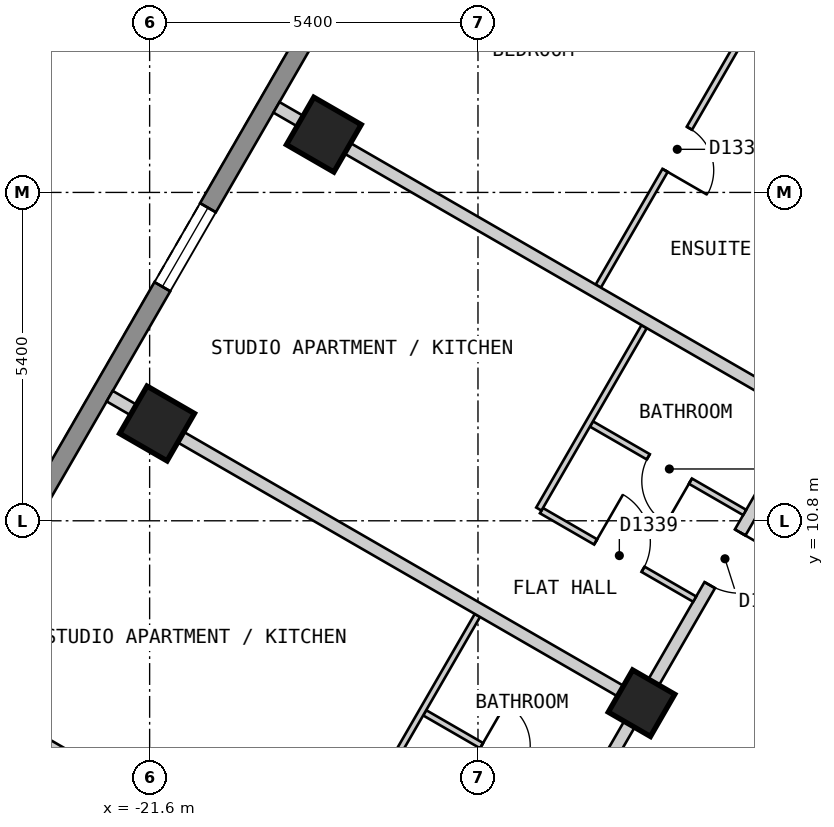
"""IFC4 building model, lengths in metres.
Left out: names, types, materials, properties, quantities, classifications, styles, units other than length and angle.
Written with IfcOpenShell. Run it as: python <this file> out.ifc"""

import sys

from ifc_helpers import new_model, si_unit, direction, frame, frame_2d, origin, origin_2d, place, context, subcontext, project, spatial, polyline, rectangle, outline, extrude, element, fill, save


model = new_model("IFC4")
c1 = context("Model", 3, precision=1e-05, world=origin(), true_north=direction((0.0, 1.0)))
c2 = subcontext(c1, "Body", "Model", "MODEL_VIEW")
j1 = project(units=[si_unit("LENGTHUNIT", "METRE"), si_unit("PLANEANGLEUNIT", "RADIAN")], contexts=[c1])
p1 = place(None, origin())
s1 = spatial("IfcSite", under=j1, at=p1, CompositionType="ELEMENT")
p2 = place(p1, origin())
s2 = spatial("IfcBuilding", under=s1, at=p2, CompositionType="ELEMENT")
p3 = place(p2, frame((0.0, 0.0, 135.6)))
s3 = spatial("IfcBuildingStorey", under=s2, at=p3, CompositionType="ELEMENT", Elevation=135.6)
for number, where, z_axis, x_axis in (
    (1, (-18.735, 17.15, 0.0), (0.0, 0.0, 1.0), (-0.5, -0.866, 0.0)),
    (2, (-21.478, 12.4, 0.0), (0.0, 0.0, 1.0), (-0.5, -0.866, 0.0)),
):
    element("IfcColumn", number, at=place(p3, frame(where, z_axis=z_axis, x_axis=x_axis)), inside=s3, PredefinedType="COLUMN", context=c2, shape_type="SweptSolid", body=[
        extrude(rectangle(XDim=0.9, YDim=0.9, at=origin_2d()), origin(), (0.0, 0.0, 1.0), 3.0),
    ])
p4 = place(p3, frame((-13.51, 7.8, 0.0), z_axis=(0.0, 0.0, 1.0), x_axis=(-0.5, -0.866025403784, 0.0)))
e3 = element("IfcColumn", 3, at=p4, inside=s3, PredefinedType="COLUMN", context=c2, shape_type="SweptSolid", body=[
    extrude(rectangle(XDim=0.8, YDim=0.8, at=origin_2d()), origin(), (0.0, 0.0, 1.0), 3.0),
])
p5 = place(p3, frame((-16.555, 23.025, 0.0), z_axis=(0.0, 0.0, 1.0), x_axis=(-0.500020536353, -0.866013546791, 0.0)))
e4 = element("IfcWall", 4, at=p5, inside=s3, PredefinedType="SOLIDWALL", context=c2, shape_type="SweptSolid", body=[
    extrude(outline(polyline([(0.0, -0.15), (23.325, -0.15), (23.245, 0.15), (0.08, 0.15), (0.0, -0.15)])), origin(), (0.0, 0.0, 1.0), 2.7),
])
p6 = place(p5, frame((2.685, 0.0, 0.15)))
e5 = element("IfcOpeningElement", 5, at=p6, cuts=e4, PredefinedType="OPENING", context=c2, shape_type="SweptSolid", body=[
    extrude(rectangle(XDim=1.5, YDim=2.1, at=frame_2d((0.75, 1.05))), frame((0.0, 0.16, 0.0), z_axis=(0.0, -1.0, 0.0), x_axis=(1.0, 0.0, 0.0)), (0.0, 0.0, 1.0), 0.32),
])
p7 = place(p5, frame((8.171, 0.0, 0.15)))
e6 = element("IfcOpeningElement", 6, at=p7, cuts=e4, PredefinedType="OPENING", context=c2, shape_type="SweptSolid", body=[
    extrude(rectangle(XDim=1.5, YDim=2.1, at=frame_2d((0.75, 1.05))), frame((0.0, 0.16, 0.0), z_axis=(0.0, -1.0, 0.0), x_axis=(1.0, 0.0, 0.0)), (0.0, 0.0, 1.0), 0.32),
])
p8 = place(p5, frame((13.655, 0.0, 0.15)))
e7 = element("IfcOpeningElement", 7, at=p8, cuts=e4, PredefinedType="OPENING", context=c2, shape_type="SweptSolid", body=[
    extrude(rectangle(XDim=1.5, YDim=2.1, at=frame_2d((0.75, 1.05))), frame((0.0, 0.16, 0.0), z_axis=(0.0, -1.0, 0.0), x_axis=(1.0, 0.0, 0.0)), (0.0, 0.0, 1.0), 0.32),
])
p9 = place(p5, frame((19.14, 0.0, 0.15)))
e8 = element("IfcOpeningElement", 8, at=p9, cuts=e4, PredefinedType="OPENING", context=c2, shape_type="SweptSolid", body=[
    extrude(rectangle(XDim=1.5, YDim=2.1, at=frame_2d((0.75, 1.05))), frame((0.0, 0.16, 0.0), z_axis=(0.0, -1.0, 0.0), x_axis=(1.0, 0.0, 0.0)), (0.0, 0.0, 1.0), 0.32),
])
p10 = place(p3, frame((-15.242, 0.399, 0.0), z_axis=(0.0, 0.0, 1.0), x_axis=(0.499953615651, 0.866052182145, 0.0)))
e9 = element("IfcWall", 9, at=p10, inside=s3, PredefinedType="PARTITIONING", context=c2, shape_type="SweptSolid", body=[
    extrude(rectangle(XDim=8.777, YDim=0.2, at=frame_2d((4.388, 0.0))), origin(), (0.0, 0.0, 1.0), 2.7),
])
p11 = place(p10, frame((3.938, 0.0, 0.0)))
e10 = element("IfcOpeningElement", 10, at=p11, cuts=e9, PredefinedType="OPENING", context=c2, shape_type="SweptSolid", body=[
    extrude(rectangle(XDim=0.9, YDim=2.1, at=frame_2d((0.45, 1.05))), frame((0.0, 0.11, 0.0), z_axis=(0.0, -1.0, 0.0), x_axis=(1.0, 0.0, 0.0)), (0.0, 0.0, 1.0), 0.22),
])
p12 = place(p3, frame((-17.724, 0.5, 0.0), z_axis=(0.0, 0.0, 1.0), x_axis=(0.499994801602, 0.86602840506, 0.0)))
e11 = element("IfcWall", 11, at=p12, inside=s3, PredefinedType="PARTITIONING", context=c2, shape_type="SweptSolid", body=[
    extrude(rectangle(XDim=16.916, YDim=0.2, at=frame_2d((8.458, 0.0))), origin(), (0.0, 0.0, 1.0), 2.7),
])
p13 = place(p12, frame((10.672, 0.0, 0.0)))
e12 = element("IfcOpeningElement", 12, at=p13, cuts=e11, PredefinedType="OPENING", context=c2, shape_type="SweptSolid", body=[
    extrude(rectangle(XDim=1.0, YDim=2.1, at=frame_2d((0.5, 1.05))), frame((0.0, 0.11, 0.0), z_axis=(0.0, -1.0, 0.0), x_axis=(1.0, 0.0, 0.0)), (0.0, 0.0, 1.0), 0.22),
])
p14 = place(p12, frame((5.187, 0.0, 0.0)))
e13 = element("IfcOpeningElement", 13, at=p14, cuts=e11, PredefinedType="OPENING", context=c2, shape_type="SweptSolid", body=[
    extrude(rectangle(XDim=1.0, YDim=2.1, at=frame_2d((0.5, 1.05))), frame((0.0, 0.11, 0.0), z_axis=(0.0, -1.0, 0.0), x_axis=(1.0, 0.0, 0.0)), (0.0, 0.0, 1.0), 0.22),
])
p15 = place(p12, frame((0.566, 0.0, 0.0)))
e14 = element("IfcOpeningElement", 14, at=p15, cuts=e11, PredefinedType="OPENING", context=c2, shape_type="SweptSolid", body=[
    extrude(rectangle(XDim=1.0, YDim=2.1, at=frame_2d((0.5, 1.05))), frame((0.0, 0.11, 0.0), z_axis=(0.0, -1.0, 0.0), x_axis=(1.0, 0.0, 0.0)), (0.0, 0.0, 1.0), 0.22),
])
p16 = place(p3, frame((-14.37, 24.09, 0.0), z_axis=(0.0, 0.0, 1.0), x_axis=(0.50002438799, -0.866011322914, 0.0)))
e15 = element("IfcWall", 15, at=p16, inside=s3, PredefinedType="PARTITIONING", context=c2, shape_type="SweptSolid", body=[
    extrude(rectangle(XDim=10.266, YDim=0.1, at=frame_2d((5.133, 0.0))), origin(), (0.0, 0.0, 1.0), 2.7),
])
p17 = place(p16, frame((2.347, 0.0, 0.0)))
e16 = element("IfcOpeningElement", 16, at=p17, cuts=e15, PredefinedType="OPENING", context=c2, shape_type="SweptSolid", body=[
    extrude(rectangle(XDim=0.9, YDim=2.1, at=frame_2d((0.45, 1.05))), frame((0.0, 0.06, 0.0), z_axis=(0.0, -1.0, 0.0), x_axis=(1.0, 0.0, 0.0)), (0.0, 0.0, 1.0), 0.12),
])
p18 = place(p3, frame((-17.076, 7.642, 0.0), z_axis=(0.0, 0.0, 1.0), x_axis=(0.866003949776, -0.500037157592, 0.0)))
e17 = element("IfcWall", 17, at=p18, inside=s3, PredefinedType="PARTITIONING", context=c2, shape_type="SweptSolid", body=[
    extrude(rectangle(XDim=2.91, YDim=0.1, at=frame_2d((1.455, 0.0))), origin(), (0.0, 0.0, 1.0), 2.7),
])
p19 = place(p18, frame((1.08, 0.0, 0.0)))
e18 = element("IfcOpeningElement", 18, at=p19, cuts=e17, PredefinedType="OPENING", context=c2, shape_type="SweptSolid", body=[
    extrude(rectangle(XDim=0.8, YDim=2.1, at=frame_2d((0.4, 1.05))), frame((0.0, 0.06, 0.0), z_axis=(0.0, -1.0, 0.0), x_axis=(1.0, 0.0, 0.0)), (0.0, 0.0, 1.0), 0.12),
])
p20 = place(p3, frame((-14.334, 12.392, 0.0), z_axis=(0.0, 0.0, 1.0), x_axis=(0.866003949776, -0.500037157592, 0.0)))
e19 = element("IfcWall", 19, at=p20, inside=s3, PredefinedType="PARTITIONING", context=c2, shape_type="SweptSolid", body=[
    extrude(rectangle(XDim=2.91, YDim=0.1, at=frame_2d((1.455, 0.0))), origin(), (0.0, 0.0, 1.0), 2.7),
])
p21 = place(p20, frame((1.08, 0.0, 0.0)))
e20 = element("IfcOpeningElement", 20, at=p21, cuts=e19, PredefinedType="OPENING", context=c2, shape_type="SweptSolid", body=[
    extrude(rectangle(XDim=0.8, YDim=2.1, at=frame_2d((0.4, 1.05))), frame((0.0, 0.06, 0.0), z_axis=(0.0, -1.0, 0.0), x_axis=(1.0, 0.0, 0.0)), (0.0, 0.0, 1.0), 0.12),
])
p22 = place(p3, frame((-15.156, 10.967, 0.0), z_axis=(0.0, 0.0, 1.0), x_axis=(0.866003949776, -0.500037157592, 0.0)))
e21 = element("IfcWall", 21, at=p22, inside=s3, PredefinedType="PARTITIONING", context=c2, shape_type="SweptSolid", body=[
    extrude(rectangle(XDim=2.91, YDim=0.1, at=frame_2d((1.455, 0.0))), origin(), (0.0, 0.0, 1.0), 2.7),
])
p23 = place(p22, frame((1.029, 0.0, 0.0)))
e22 = element("IfcOpeningElement", 22, at=p23, cuts=e21, PredefinedType="OPENING", context=c2, shape_type="SweptSolid", body=[
    extrude(rectangle(XDim=0.9, YDim=2.1, at=frame_2d((0.45, 1.05))), frame((0.0, 0.06, 0.0), z_axis=(0.0, -1.0, 0.0), x_axis=(1.0, 0.0, 0.0)), (0.0, 0.0, 1.0), 0.12),
])
p24 = place(p3, frame((-17.942, 6.243, 0.0), z_axis=(0.0, 0.0, 1.0), x_axis=(0.49997462182, 0.866040055388, 0.0)))
e23 = element("IfcWall", 23, at=p24, inside=s3, PredefinedType="PARTITIONING", context=c2, shape_type="SweptSolid", body=[
    extrude(rectangle(XDim=3.464, YDim=0.1, at=frame_2d((1.732, 0.0))), origin(), (0.0, 0.0, 1.0), 2.7),
])
p25 = place(p3, frame((-15.199, 10.993, 0.0), z_axis=(0.0, 0.0, 1.0), x_axis=(0.499885210257, 0.866091667531, 0.0)))
e24 = element("IfcWall", 24, at=p25, inside=s3, PredefinedType="PARTITIONING", context=c2, shape_type="SweptSolid", body=[
    extrude(rectangle(XDim=3.463, YDim=0.1, at=frame_2d((1.731, 0.0))), origin(), (0.0, 0.0, 1.0), 2.7),
])
p26 = place(p3, frame((-14.222, 14.659, 0.0), z_axis=(0.0, 0.0, 1.0), x_axis=(0.500053212623, 0.865994679283, 0.0)))
e25 = element("IfcWall", 25, at=p26, inside=s3, PredefinedType="PARTITIONING", context=c2, shape_type="SweptSolid", body=[
    extrude(rectangle(XDim=5.239, YDim=0.1, at=frame_2d((2.62, 0.0))), origin(), (0.0, 0.0, 1.0), 2.7),
])
p27 = place(p26, frame((2.198, 0.0, 0.0)))
e26 = element("IfcOpeningElement", 26, at=p27, cuts=e25, PredefinedType="OPENING", context=c2, shape_type="SweptSolid", body=[
    extrude(rectangle(XDim=0.8, YDim=2.1, at=frame_2d((0.4, 1.05))), frame((0.0, 0.06, 0.0), z_axis=(0.0, -1.0, 0.0), x_axis=(1.0, 0.0, 0.0)), (0.0, 0.0, 1.0), 0.12),
])
p28 = place(p3, frame((-24.999, 8.1, 0.0), z_axis=(0.0, 0.0, 1.0), x_axis=(0.866016855193, -0.500014806302, 0.0)))
e27 = element("IfcWall", 27, at=p28, inside=s3, PredefinedType="PARTITIONING", context=c2, shape_type="SweptSolid", body=[
    extrude(rectangle(XDim=10.0, YDim=0.2, at=frame_2d((5.0, 0.0))), origin(), (0.0, 0.0, 1.0), 2.7),
])
p29 = place(p3, frame((-22.257, 12.85, 0.0), z_axis=(0.0, 0.0, 1.0), x_axis=(0.866047370643, -0.499961950354, 0.0)))
e28 = element("IfcWall", 28, at=p29, inside=s3, PredefinedType="PARTITIONING", context=c2, shape_type="SweptSolid", body=[
    extrude(rectangle(XDim=10.001, YDim=0.2, at=frame_2d((5.0, 0.0))), origin(), (0.0, 0.0, 1.0), 2.7),
])
p30 = place(p3, frame((-19.514, 17.599, 0.0), z_axis=(0.0, 0.0, 1.0), x_axis=(0.866059142644, -0.499941558027, 0.0)))
e29 = element("IfcWall", 29, at=p30, inside=s3, PredefinedType="PARTITIONING", context=c2, shape_type="SweptSolid", body=[
    extrude(rectangle(XDim=9.999, YDim=0.2, at=frame_2d((5.0, 0.0))), origin(), (0.0, 0.0, 1.0), 2.7),
])
p31 = place(p7, origin())
e30 = element("IfcWindow", 30, at=p31, inside=s3, PartitioningType="SINGLE_PANEL", PredefinedType="WINDOW", context=c2, shape_type="SweptSolid", body=[
    extrude(rectangle(XDim=1.5, YDim=2.1, at=frame_2d((0.75, 1.05))), frame((0.0, 0.03, 0.0), z_axis=(0.0, -1.0, 0.0), x_axis=(1.0, 0.0, 0.0)), (0.0, 0.0, 1.0), 0.06),
])
fill(e6, e30)
p32 = place(p27, origin())
e31 = element("IfcDoor", 31, at=p32, inside=s3, OperationType="SINGLE_SWING_LEFT", PredefinedType="DOOR", context=c2, shape_type="SweptSolid", body=[
    extrude(rectangle(XDim=0.8, YDim=2.1, at=frame_2d((0.4, 1.05))), frame((0.0, 0.025, 0.0), z_axis=(0.0, -1.0, 0.0), x_axis=(1.0, 0.0, 0.0)), (0.0, 0.0, 1.0), 0.05),
])
fill(e26, e31)
p33 = place(p13, origin())
e32 = element("IfcDoor", 32, at=p33, inside=s3, OperationType="SINGLE_SWING_RIGHT", PredefinedType="DOOR", context=c2, shape_type="SweptSolid", body=[
    extrude(rectangle(XDim=1.0, YDim=2.1, at=frame_2d((0.5, 1.05))), frame((0.0, 0.025, 0.0), z_axis=(0.0, -1.0, 0.0), x_axis=(1.0, 0.0, 0.0)), (0.0, 0.0, 1.0), 0.05),
])
fill(e12, e32)
p34 = place(p23, origin())
e33 = element("IfcDoor", 33, at=p34, inside=s3, OperationType="SINGLE_SWING_LEFT", PredefinedType="DOOR", context=c2, shape_type="SweptSolid", body=[
    extrude(rectangle(XDim=0.9, YDim=2.1, at=frame_2d((0.45, 1.05))), frame((0.0, 0.025, 0.0), z_axis=(0.0, -1.0, 0.0), x_axis=(1.0, 0.0, 0.0)), (0.0, 0.0, 1.0), 0.05),
])
fill(e22, e33)
p35 = place(p21, origin())
e34 = element("IfcDoor", 34, at=p35, inside=s3, OperationType="SINGLE_SWING_RIGHT", PredefinedType="DOOR", context=c2, shape_type="SweptSolid", body=[
    extrude(rectangle(XDim=0.8, YDim=2.1, at=frame_2d((0.4, 1.05))), frame((0.0, 0.025, 0.0), z_axis=(0.0, -1.0, 0.0), x_axis=(1.0, 0.0, 0.0)), (0.0, 0.0, 1.0), 0.05),
])
fill(e20, e34)
p36 = place(p19, origin())
e35 = element("IfcDoor", 35, at=p36, inside=s3, OperationType="SINGLE_SWING_LEFT", PredefinedType="DOOR", context=c2, shape_type="SweptSolid", body=[
    extrude(rectangle(XDim=0.8, YDim=2.1, at=frame_2d((0.4, 1.05))), frame((0.0, 0.025, 0.0), z_axis=(0.0, -1.0, 0.0), x_axis=(1.0, 0.0, 0.0)), (0.0, 0.0, 1.0), 0.05),
])
fill(e18, e35)
save(model, sys.argv[1])
